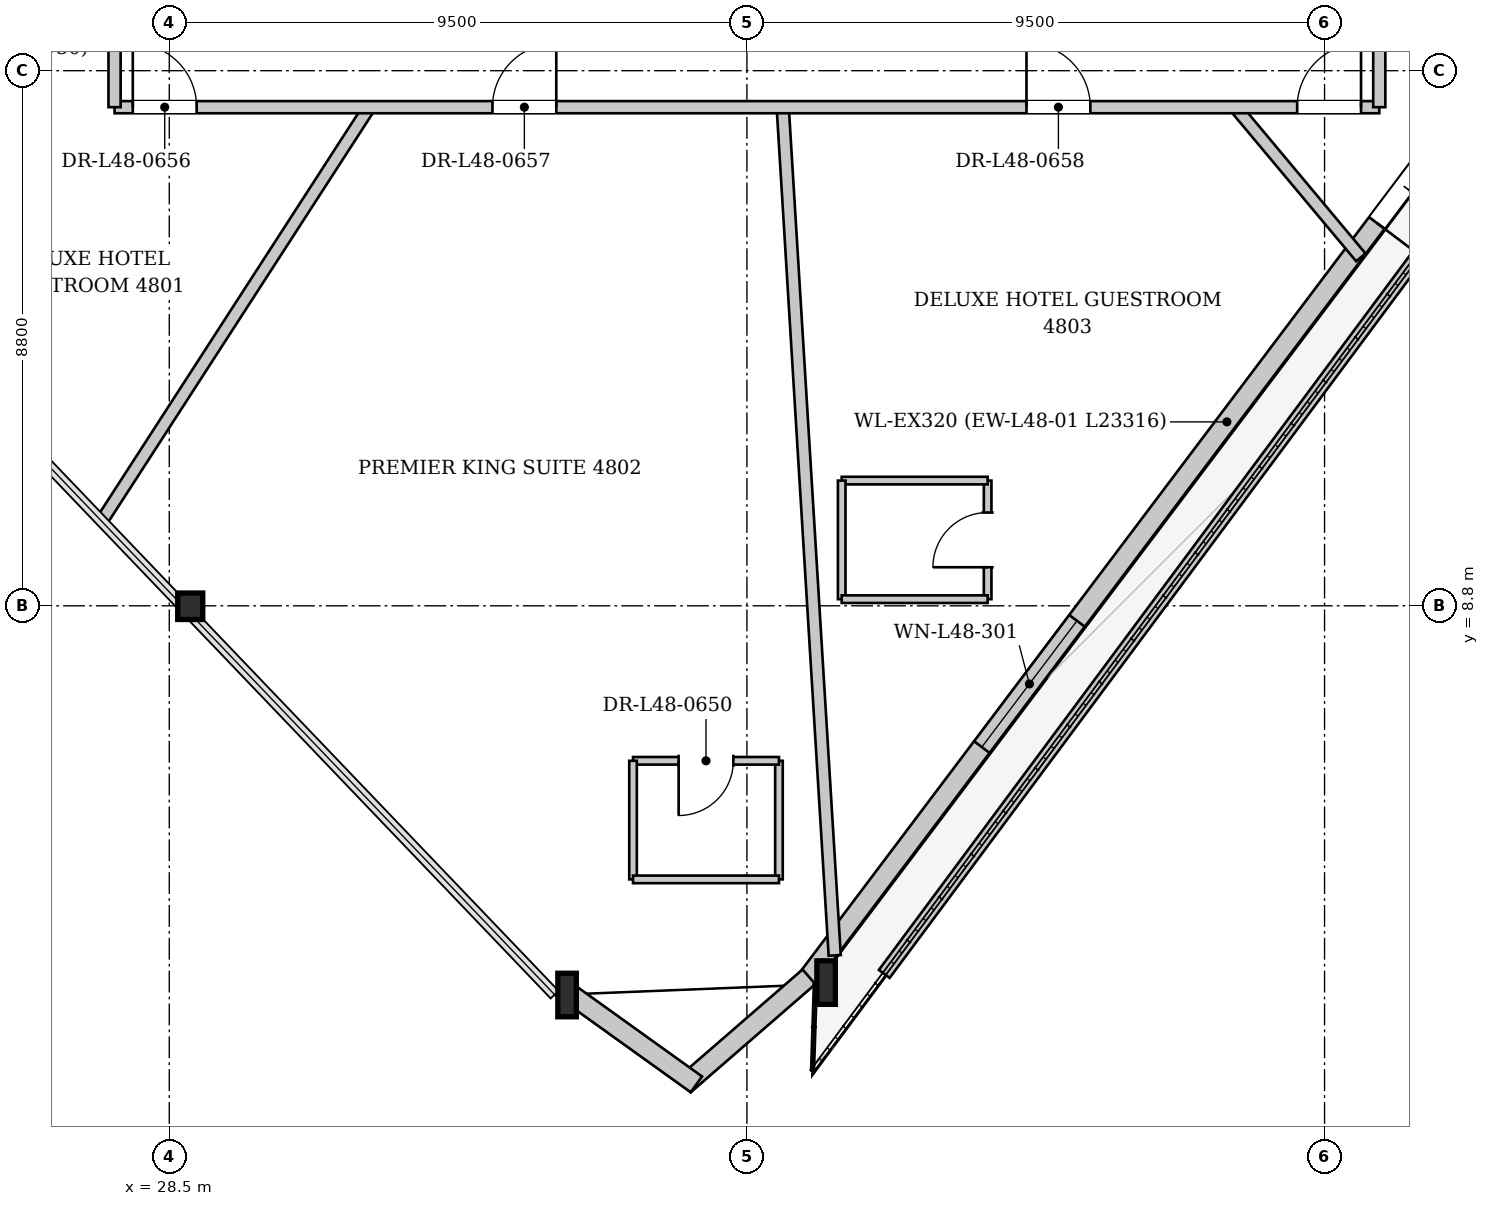
"""IFC4 building model, lengths in metres.
Left out: names, types, materials, properties, quantities, classifications, styles, units other than length and angle.
Written with IfcOpenShell. Run it as: python <this file> out.ifc"""

import sys

from ifc_helpers import new_model, si_unit, direction, frame, frame_2d, origin, origin_2d, place, context, subcontext, project, spatial, rectangle, i_section, extrude, source, transform, mapped, element, fill, save


model = new_model("IFC4")
c1 = context("Model", 3, precision=1e-05, world=origin(), true_north=direction((0.0, 1.0)))
c2 = subcontext(c1, "Body", "Model", "MODEL_VIEW")
j1 = project(units=[si_unit("LENGTHUNIT", "METRE"), si_unit("PLANEANGLEUNIT", "RADIAN")], contexts=[c1])
p1 = place(None, origin())
s1 = spatial("IfcSite", under=j1, at=p1, CompositionType="ELEMENT")
p2 = place(p1, origin())
s2 = spatial("IfcBuilding", under=s1, at=p2, CompositionType="ELEMENT")
p3 = place(p2, frame((0.0, 0.0, 182.1)))
s3 = spatial("IfcBuildingStorey", under=s2, at=p3, CompositionType="ELEMENT", Elevation=182.1)
m1 = source(origin(), c2, "Body", "SweptSolid", [
    extrude(i_section(OverallWidth=0.412, OverallDepth=0.435, WebThickness=0.031, FlangeThickness=0.05, at=origin_2d()), origin(), (0.0, 0.0, 1.0), 3.403),
])
p4 = place(p3, frame((28.678, 8.842, 0.0), z_axis=(0.097721324464, -0.028986354687, 0.994791603295), x_axis=(0.284375913193, 0.958712855862, 0.0)))
e1 = element("IfcColumn", 1, at=p4, inside=s3, PredefinedType="COLUMN", context=c2, shape_type="MappedRepresentation", body=[
    mapped(m1, transform((0.0, 0.0, 0.0), x_axis=(1.0, 0.0, 0.0), y_axis=(0.0, 1.0, 0.0), z_axis=(0.0, 0.0, 1.0), scale=1.0)),
])
m2 = source(origin(), c2, "Body", "SweptSolid", [
    extrude(i_section(OverallWidth=0.304, OverallDepth=0.716, WebThickness=0.021, FlangeThickness=0.04, at=origin_2d()), origin(), (0.0, 0.0, 1.0), 3.41),
])
p5 = place(p3, frame((34.837, 2.405, 0.0), z_axis=(0.120076161296, -0.003508486526, 0.992758483223), x_axis=(0.029206378494, 0.999573402735, 0.0)))
e2 = element("IfcColumn", 2, at=p5, inside=s3, PredefinedType="COLUMN", context=c2, shape_type="MappedRepresentation", body=[
    mapped(m2, transform((0.0, 0.0, 0.0), x_axis=(1.0, 0.0, 0.0), y_axis=(0.0, 1.0, 0.0), z_axis=(0.0, 0.0, 1.0), scale=1.0)),
])
m3 = source(origin(), c2, "Body", "SweptSolid", [
    extrude(i_section(OverallWidth=0.304, OverallDepth=0.716, WebThickness=0.021, FlangeThickness=0.04, at=origin_2d()), origin(), (0.0, 0.0, 1.0), 3.404),
])
p6 = place(p3, frame((39.125, 2.577, 0.0), z_axis=(0.104354873032, 0.01549185744, 0.994419460202), x_axis=(-0.146844314237, 0.989159616733, 0.0)))
e3 = element("IfcColumn", 3, at=p6, inside=s3, PredefinedType="COLUMN", context=c2, shape_type="MappedRepresentation", body=[
    mapped(m3, transform((0.0, 0.0, 0.0), x_axis=(1.0, 0.0, 0.0), y_axis=(0.0, 1.0, 0.0), z_axis=(0.0, 0.0, 1.0), scale=1.0)),
])
p7 = place(p3, frame((53.031, 21.293, 0.0), z_axis=(0.0, 0.0, 1.0), x_axis=(-0.601886435851, -0.798581691713, 0.0)))
e4 = element("IfcWall", 4, at=p7, inside=s3, PredefinedType="SOLIDWALL", context=c2, shape_type="SweptSolid", body=[
    extrude(rectangle(XDim=23.316, YDim=0.32, at=frame_2d((11.658, 0.0))), origin(), (0.0, 0.0, 1.0), 2.722),
])
p8 = place(p7, frame((6.261, 0.0, 0.0)))
e5 = element("IfcOpeningElement", 5, at=p8, cuts=e4, PredefinedType="OPENING", context=c2, shape_type="SweptSolid", body=[
    extrude(rectangle(XDim=1.5, YDim=2.3, at=frame_2d((0.75, 1.15))), frame((0.0, 0.17, 0.0), z_axis=(0.0, -1.0, 0.0), x_axis=(1.0, 0.0, 0.0)), (0.0, 0.0, 1.0), 0.34),
])
p9 = place(p7, frame((15.954, 0.0, 0.252)))
e6 = element("IfcOpeningElement", 6, at=p9, cuts=e4, PredefinedType="OPENING", context=c2, shape_type="SweptSolid", body=[
    extrude(rectangle(XDim=2.6, YDim=2.35, at=frame_2d((1.3, 1.175))), frame((0.0, 0.17, 0.0), z_axis=(0.0, -1.0, 0.0), x_axis=(1.0, 0.0, 0.0)), (0.0, 0.0, 1.0), 0.34),
])
p10 = place(p3, frame((39.02, 2.698, 0.0), z_axis=(0.0, 0.0, 1.0), x_axis=(-0.755496043455, -0.65515320981, 0.0)))
e7 = element("IfcWall", 7, at=p10, inside=s3, PredefinedType="SOLIDWALL", context=c2, shape_type="SweptSolid", body=[
    extrude(rectangle(XDim=2.713, YDim=0.32, at=frame_2d((1.356, 0.0))), origin(), (0.0, 0.0, 1.0), 2.722),
])
p11 = place(p3, frame((37.169, 0.93, 0.0), z_axis=(0.0, 0.0, 1.0), x_axis=(-0.812593922161, 0.582830264886, 0.0)))
e8 = element("IfcWall", 8, at=p11, inside=s3, PredefinedType="SOLIDWALL", context=c2, shape_type="SweptSolid", body=[
    extrude(rectangle(XDim=2.754, YDim=0.32, at=frame_2d((1.377, 0.0))), origin(), (0.0, 0.0, 1.0), 2.722),
])
p12 = place(p3, frame((40.259, 2.746, 0.0), z_axis=(0.0, 0.0, 1.0), x_axis=(0.596468885173, 0.80263619967, 0.0)))
e9 = element("IfcWall", 9, at=p12, inside=s3, PredefinedType="PARAPET", context=c2, shape_type="SweptSolid", body=[
    extrude(rectangle(XDim=20.754, YDim=0.22, at=frame_2d((10.377, 0.0))), origin(), (0.0, 0.0, 1.0), 0.3),
])
p13 = place(p3, frame((31.791, 17.0, 0.0), z_axis=(0.0, 0.0, 1.0), x_axis=(-0.543103391012, -0.839665830358, 0.0)))
e10 = element("IfcWall", 10, at=p13, inside=s3, PredefinedType="PARTITIONING", context=c2, shape_type="SweptSolid", body=[
    extrude(rectangle(XDim=8.078, YDim=0.2, at=frame_2d((4.039, 0.0))), origin(), (0.0, 0.0, 1.0), 3.33),
])
p14 = place(p3, frame((38.589, 17.0, 0.0), z_axis=(0.0, 0.0, 1.0), x_axis=(0.061210221515, -0.998124896384, 0.0)))
e11 = element("IfcWall", 11, at=p14, inside=s3, PredefinedType="PARTITIONING", context=c2, shape_type="SweptSolid", body=[
    extrude(rectangle(XDim=13.976, YDim=0.2, at=frame_2d((6.988, 0.0))), origin(), (0.0, 0.0, 1.0), 3.005),
])
p15 = place(p3, frame((46.031, 17.0, 0.0), z_axis=(0.0, 0.0, 1.0), x_axis=(0.641652542472, -0.766995446361, 0.0)))
e12 = element("IfcWall", 12, at=p15, inside=s3, PredefinedType="PARTITIONING", context=c2, shape_type="SweptSolid", body=[
    extrude(rectangle(XDim=3.22, YDim=0.2, at=frame_2d((1.61, 0.0))), origin(), (0.0, 0.0, 1.0), 3.33),
])
p16 = place(p3, frame((38.527, 4.301, 0.0), z_axis=(0.0, 0.0, 1.0), x_axis=(0.0, 1.0, 0.0)))
e13 = element("IfcWall", 13, at=p16, inside=s3, PredefinedType="PARTITIONING", context=c2, shape_type="SweptSolid", body=[
    extrude(rectangle(XDim=1.95, YDim=0.125, at=frame_2d((0.975, 0.0))), origin(), (0.0, 0.0, 1.0), 3.33),
])
p17 = place(p3, frame((38.527, 6.251, 0.0), z_axis=(0.0, 0.0, 1.0), x_axis=(-1.0, 0.0, 0.0)))
e14 = element("IfcWall", 14, at=p17, inside=s3, PredefinedType="PARTITIONING", context=c2, shape_type="SweptSolid", body=[
    extrude(rectangle(XDim=2.4, YDim=0.125, at=frame_2d((1.2, 0.0))), origin(), (0.0, 0.0, 1.0), 3.33),
])
p18 = place(p17, frame((0.75, 0.0, 0.0)))
e15 = element("IfcOpeningElement", 15, at=p18, cuts=e14, PredefinedType="OPENING", context=c2, shape_type="SweptSolid", body=[
    extrude(rectangle(XDim=0.9, YDim=2.1, at=frame_2d((0.45, 1.05))), frame((0.0, 0.073, 0.0), z_axis=(0.0, -1.0, 0.0), x_axis=(1.0, 0.0, 0.0)), (0.0, 0.0, 1.0), 0.145),
])
p19 = place(p3, frame((36.127, 6.251, 0.0), z_axis=(0.0, 0.0, 1.0), x_axis=(0.0, -1.0, 0.0)))
e16 = element("IfcWall", 16, at=p19, inside=s3, PredefinedType="PARTITIONING", context=c2, shape_type="SweptSolid", body=[
    extrude(rectangle(XDim=1.95, YDim=0.125, at=frame_2d((0.975, 0.0))), origin(), (0.0, 0.0, 1.0), 3.33),
])
p20 = place(p3, frame((36.127, 4.301, 0.0), z_axis=(0.0, 0.0, 1.0), x_axis=(1.0, 0.0, 0.0)))
e17 = element("IfcWall", 17, at=p20, inside=s3, PredefinedType="PARTITIONING", context=c2, shape_type="SweptSolid", body=[
    extrude(rectangle(XDim=2.4, YDim=0.125, at=frame_2d((1.2, 0.0))), origin(), (0.0, 0.0, 1.0), 3.33),
])
p21 = place(p3, frame((41.959, 8.909, 0.0), z_axis=(0.0, 0.0, 1.0), x_axis=(0.0, 1.0, 0.0)))
e18 = element("IfcWall", 18, at=p21, inside=s3, PredefinedType="PARTITIONING", context=c2, shape_type="SweptSolid", body=[
    extrude(rectangle(XDim=1.95, YDim=0.125, at=frame_2d((0.975, 0.0))), origin(), (0.0, 0.0, 1.0), 3.33),
])
p22 = place(p21, frame((0.525, 0.0, 0.0)))
e19 = element("IfcOpeningElement", 19, at=p22, cuts=e18, PredefinedType="OPENING", context=c2, shape_type="SweptSolid", body=[
    extrude(rectangle(XDim=0.9, YDim=2.1, at=frame_2d((0.45, 1.05))), frame((0.0, 0.073, 0.0), z_axis=(0.0, -1.0, 0.0), x_axis=(1.0, 0.0, 0.0)), (0.0, 0.0, 1.0), 0.145),
])
p23 = place(p3, frame((41.959, 10.859, 0.0), z_axis=(0.0, 0.0, 1.0), x_axis=(-1.0, 0.0, 0.0)))
e20 = element("IfcWall", 20, at=p23, inside=s3, PredefinedType="PARTITIONING", context=c2, shape_type="SweptSolid", body=[
    extrude(rectangle(XDim=2.4, YDim=0.125, at=frame_2d((1.2, 0.0))), origin(), (0.0, 0.0, 1.0), 3.33),
])
p24 = place(p3, frame((39.559, 10.859, 0.0), z_axis=(0.0, 0.0, 1.0), x_axis=(0.0, -1.0, 0.0)))
e21 = element("IfcWall", 21, at=p24, inside=s3, PredefinedType="PARTITIONING", context=c2, shape_type="SweptSolid", body=[
    extrude(rectangle(XDim=1.95, YDim=0.125, at=frame_2d((0.975, 0.0))), origin(), (0.0, 0.0, 1.0), 3.33),
])
p25 = place(p3, frame((39.559, 8.909, 0.0), z_axis=(0.0, 0.0, 1.0), x_axis=(1.0, 0.0, 0.0)))
e22 = element("IfcWall", 22, at=p25, inside=s3, PredefinedType="PARTITIONING", context=c2, shape_type="SweptSolid", body=[
    extrude(rectangle(XDim=2.4, YDim=0.125, at=frame_2d((1.2, 0.0))), origin(), (0.0, 0.0, 1.0), 3.33),
])
p26 = place(p3, frame((27.6, 17.0, 0.0), z_axis=(0.0, 0.0, 1.0), x_axis=(1.0, 0.0, 0.0)))
e23 = element("IfcWall", 23, at=p26, inside=s3, PredefinedType="PARTITIONING", context=c2, shape_type="SweptSolid", body=[
    extrude(rectangle(XDim=20.8, YDim=0.2, at=frame_2d((10.4, 0.0))), origin(), (0.0, 0.0, 1.0), 3.33),
])
p27 = place(p26, frame((0.3, 0.0, 0.0)))
e24 = element("IfcOpeningElement", 24, at=p27, cuts=e23, PredefinedType="OPENING", context=c2, shape_type="SweptSolid", body=[
    extrude(rectangle(XDim=1.05, YDim=2.2, at=frame_2d((0.525, 1.1))), frame((0.0, 0.11, 0.0), z_axis=(0.0, -1.0, 0.0), x_axis=(1.0, 0.0, 0.0)), (0.0, 0.0, 1.0), 0.22),
])
p28 = place(p26, frame((6.215, 0.0, 0.0)))
e25 = element("IfcOpeningElement", 25, at=p28, cuts=e23, PredefinedType="OPENING", context=c2, shape_type="SweptSolid", body=[
    extrude(rectangle(XDim=1.05, YDim=2.2, at=frame_2d((0.525, 1.1))), frame((0.0, 0.11, 0.0), z_axis=(0.0, -1.0, 0.0), x_axis=(1.0, 0.0, 0.0)), (0.0, 0.0, 1.0), 0.22),
])
p29 = place(p26, frame((14.998, 0.0, 0.0)))
e26 = element("IfcOpeningElement", 26, at=p29, cuts=e23, PredefinedType="OPENING", context=c2, shape_type="SweptSolid", body=[
    extrude(rectangle(XDim=1.05, YDim=2.2, at=frame_2d((0.525, 1.1))), frame((0.0, 0.11, 0.0), z_axis=(0.0, -1.0, 0.0), x_axis=(1.0, 0.0, 0.0)), (0.0, 0.0, 1.0), 0.22),
])
p30 = place(p26, frame((19.45, 0.0, 0.0)))
e27 = element("IfcOpeningElement", 27, at=p30, cuts=e23, PredefinedType="OPENING", context=c2, shape_type="SweptSolid", body=[
    extrude(rectangle(XDim=1.05, YDim=2.2, at=frame_2d((0.525, 1.1))), frame((0.0, 0.11, 0.0), z_axis=(0.0, -1.0, 0.0), x_axis=(1.0, 0.0, 0.0)), (0.0, 0.0, 1.0), 0.22),
])
p31 = place(p3, frame((27.6, 17.0, 0.0), z_axis=(0.0, 0.0, 1.0), x_axis=(0.0, 1.0, 0.0)))
e28 = element("IfcWall", 28, at=p31, inside=s3, PredefinedType="PARTITIONING", context=c2, shape_type="SweptSolid", body=[
    extrude(rectangle(XDim=19.2, YDim=0.2, at=frame_2d((9.6, 0.0))), origin(), (0.0, 0.0, 1.0), 3.33),
])
p32 = place(p31, frame((17.85, 0.0, 0.0)))
e29 = element("IfcOpeningElement", 29, at=p32, cuts=e28, PredefinedType="OPENING", context=c2, shape_type="SweptSolid", body=[
    extrude(rectangle(XDim=1.05, YDim=2.2, at=frame_2d((0.525, 1.1))), frame((0.0, 0.11, 0.0), z_axis=(0.0, -1.0, 0.0), x_axis=(1.0, 0.0, 0.0)), (0.0, 0.0, 1.0), 0.22),
])
p33 = place(p31, frame((8.043, 0.0, 0.0)))
e30 = element("IfcOpeningElement", 30, at=p33, cuts=e28, PredefinedType="OPENING", context=c2, shape_type="SweptSolid", body=[
    extrude(rectangle(XDim=1.05, YDim=2.2, at=frame_2d((0.525, 1.1))), frame((0.0, 0.11, 0.0), z_axis=(0.0, -1.0, 0.0), x_axis=(1.0, 0.0, 0.0)), (0.0, 0.0, 1.0), 0.22),
])
p34 = place(p3, frame((48.4, 17.0, 0.0), z_axis=(0.0, 0.0, 1.0), x_axis=(0.0, 1.0, 0.0)))
e31 = element("IfcWall", 31, at=p34, inside=s3, PredefinedType="PARTITIONING", context=c2, shape_type="SweptSolid", body=[
    extrude(rectangle(XDim=19.2, YDim=0.2, at=frame_2d((9.6, 0.0))), origin(), (0.0, 0.0, 1.0), 3.33),
])
p35 = place(p34, frame((9.478, 0.0, 0.0)))
e32 = element("IfcOpeningElement", 32, at=p35, cuts=e31, PredefinedType="OPENING", context=c2, shape_type="SweptSolid", body=[
    extrude(rectangle(XDim=1.05, YDim=2.2, at=frame_2d((0.525, 1.1))), frame((0.0, 0.11, 0.0), z_axis=(0.0, -1.0, 0.0), x_axis=(1.0, 0.0, 0.0)), (0.0, 0.0, 1.0), 0.22),
])
m4 = source(origin(), c2, "Body", "SweptSolid", [
    extrude(rectangle(XDim=1.5, YDim=2.3, at=frame_2d((0.75, 1.15))), frame((0.0, 0.025, 0.0), z_axis=(0.0, -1.0, 0.0), x_axis=(1.0, 0.0, 0.0)), (0.0, 0.0, 1.0), 0.05),
])
p36 = place(p8, origin())
e33 = element("IfcDoor", 33, at=p36, inside=s3, OperationType="DOUBLE_DOOR_SINGLE_SWING", PredefinedType="DOOR", context=c2, shape_type="MappedRepresentation", body=[
    mapped(m4, transform((0.0, 0.0, 0.0), x_axis=(1.0, 0.0, 0.0), y_axis=(0.0, 1.0, 0.0), z_axis=(0.0, 0.0, 1.0), scale=1.0)),
])
fill(e5, e33)
m5 = source(origin(), c2, "Body", "SweptSolid", [
    extrude(rectangle(XDim=2.6, YDim=2.35, at=frame_2d((1.3, 1.175))), frame((0.0, 0.03, 0.0), z_axis=(0.0, -1.0, 0.0), x_axis=(1.0, 0.0, 0.0)), (0.0, 0.0, 1.0), 0.06),
])
p37 = place(p9, origin())
e34 = element("IfcWindow", 34, at=p37, inside=s3, PartitioningType="SINGLE_PANEL", PredefinedType="WINDOW", context=c2, shape_type="MappedRepresentation", body=[
    mapped(m5, transform((0.0, 0.0, 0.0), x_axis=(1.0, 0.0, 0.0), y_axis=(0.0, 1.0, 0.0), z_axis=(0.0, 0.0, 1.0), scale=1.0)),
])
fill(e6, e34)
m6 = source(origin(), c2, "Body", "SweptSolid", [
    extrude(rectangle(XDim=0.9, YDim=2.1, at=frame_2d((0.45, 1.05))), frame((0.0, 0.025, 0.0), z_axis=(0.0, -1.0, 0.0), x_axis=(1.0, 0.0, 0.0)), (0.0, 0.0, 1.0), 0.05),
])
p38 = place(p18, origin())
e35 = element("IfcDoor", 35, at=p38, inside=s3, OperationType="SINGLE_SWING_RIGHT", PredefinedType="DOOR", context=c2, shape_type="MappedRepresentation", body=[
    mapped(m6, transform((0.0, 0.0, 0.0), x_axis=(1.0, 0.0, 0.0), y_axis=(0.0, 1.0, 0.0), z_axis=(0.0, 0.0, 1.0), scale=1.0)),
])
fill(e15, e35)
p39 = place(p22, origin())
e36 = element("IfcDoor", 36, at=p39, inside=s3, OperationType="SINGLE_SWING_LEFT", PredefinedType="DOOR", context=c2, shape_type="MappedRepresentation", body=[
    mapped(m6, transform((0.0, 0.0, 0.0), x_axis=(1.0, 0.0, 0.0), y_axis=(0.0, 1.0, 0.0), z_axis=(0.0, 0.0, 1.0), scale=1.0)),
])
fill(e19, e36)
m7 = source(origin(), c2, "Body", "SweptSolid", [
    extrude(rectangle(XDim=1.05, YDim=2.2, at=frame_2d((0.525, 1.1))), frame((0.0, 0.025, 0.0), z_axis=(0.0, -1.0, 0.0), x_axis=(1.0, 0.0, 0.0)), (0.0, 0.0, 1.0), 0.05),
])
p40 = place(p27, origin())
e37 = element("IfcDoor", 37, at=p40, inside=s3, OperationType="SINGLE_SWING_LEFT", PredefinedType="DOOR", context=c2, shape_type="MappedRepresentation", body=[
    mapped(m7, transform((0.0, 0.0, 0.0), x_axis=(1.0, 0.0, 0.0), y_axis=(0.0, 1.0, 0.0), z_axis=(0.0, 0.0, 1.0), scale=1.0)),
])
fill(e24, e37)
p41 = place(p28, origin())
e38 = element("IfcDoor", 38, at=p41, inside=s3, OperationType="SINGLE_SWING_RIGHT", PredefinedType="DOOR", context=c2, shape_type="MappedRepresentation", body=[
    mapped(m7, transform((0.0, 0.0, 0.0), x_axis=(1.0, 0.0, 0.0), y_axis=(0.0, 1.0, 0.0), z_axis=(0.0, 0.0, 1.0), scale=1.0)),
])
fill(e25, e38)
p42 = place(p29, origin())
e39 = element("IfcDoor", 39, at=p42, inside=s3, OperationType="SINGLE_SWING_LEFT", PredefinedType="DOOR", context=c2, shape_type="MappedRepresentation", body=[
    mapped(m7, transform((0.0, 0.0, 0.0), x_axis=(1.0, 0.0, 0.0), y_axis=(0.0, 1.0, 0.0), z_axis=(0.0, 0.0, 1.0), scale=1.0)),
])
fill(e26, e39)
p43 = place(p30, origin())
e40 = element("IfcDoor", 40, at=p43, inside=s3, OperationType="SINGLE_SWING_RIGHT", PredefinedType="DOOR", context=c2, shape_type="MappedRepresentation", body=[
    mapped(m7, transform((0.0, 0.0, 0.0), x_axis=(1.0, 0.0, 0.0), y_axis=(0.0, 1.0, 0.0), z_axis=(0.0, 0.0, 1.0), scale=1.0)),
])
fill(e27, e40)
save(model, sys.argv[1])
